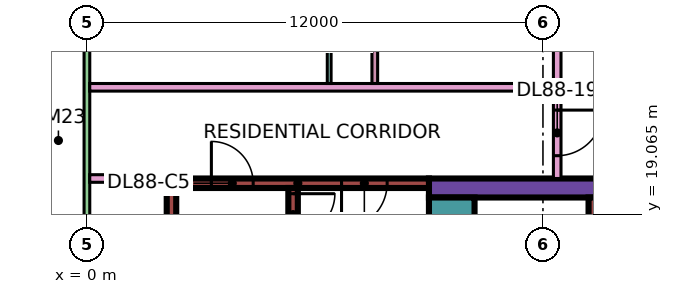
"""IFC4 building model, lengths in metres.
Left out: names, types, materials, properties, quantities, classifications, styles, units other than length and angle.
Written with IfcOpenShell. Run it as: python <this file> out.ifc"""

import sys

from ifc_helpers import new_model, si_unit, direction, frame, frame_2d, origin, place, context, subcontext, project, spatial, rectangle, extrude, element, fill, save


model = new_model("IFC4")
c1 = context("Model", 3, precision=1e-05, world=origin(), true_north=direction((0.0, 1.0)))
c2 = subcontext(c1, "Body", "Model", "MODEL_VIEW")
j1 = project(units=[si_unit("LENGTHUNIT", "METRE"), si_unit("PLANEANGLEUNIT", "RADIAN")], contexts=[c1])
p1 = place(None, origin())
s1 = spatial("IfcSite", under=j1, at=p1, CompositionType="ELEMENT")
p2 = place(p1, origin())
s2 = spatial("IfcBuilding", under=s1, at=p2, CompositionType="ELEMENT")
p3 = place(p2, frame((0.0, 0.0, 376.4)))
s3 = spatial("IfcBuildingStorey", under=s2, at=p3, CompositionType="ELEMENT", Elevation=376.4)
p4 = place(p3, frame((9.0, 19.75, 0.0), z_axis=(0.0, 0.0, 1.0), x_axis=(1.0, 0.0, 0.0)))
e1 = element("IfcWall", 1, at=p4, inside=s3, PredefinedType="SHEAR", context=c2, shape_type="SweptSolid", body=[
    extrude(rectangle(XDim=25.0, YDim=0.5, at=frame_2d((12.5, 0.0))), origin(), (0.0, 0.0, 1.0), 3.75),
])
p5 = place(p4, frame((19.1, 0.0, 0.0)))
e2 = element("IfcOpeningElement", 2, at=p5, cuts=e1, PredefinedType="OPENING", context=c2, shape_type="SweptSolid", body=[
    extrude(rectangle(XDim=1.8, YDim=2.4, at=frame_2d((0.9, 1.2))), frame((0.0, 0.26, 0.0), z_axis=(0.0, -1.0, 0.0), x_axis=(1.0, 0.0, 0.0)), (0.0, 0.0, 1.0), 0.52),
])
p6 = place(p3, frame((9.6, 7.5, 0.0), z_axis=(0.0, 0.0, 1.0), x_axis=(0.0, 1.0, 0.0)))
e3 = element("IfcWall", 3, at=p6, inside=s3, PredefinedType="SHEAR", context=c2, shape_type="SweptSolid", body=[
    extrude(rectangle(XDim=12.0, YDim=1.2, at=frame_2d((6.0, 0.0))), origin(), (0.0, 0.0, 1.0), 3.75),
])
p7 = place(p6, frame((4.375, 0.0, 0.0)))
e4 = element("IfcOpeningElement", 4, at=p7, cuts=e3, PredefinedType="OPENING", context=c2, shape_type="SweptSolid", body=[
    extrude(rectangle(XDim=1.1, YDim=2.2, at=frame_2d((0.55, 1.1))), frame((0.0, 0.61, 0.0), z_axis=(0.0, -1.0, 0.0), x_axis=(1.0, 0.0, 0.0)), (0.0, 0.0, 1.0), 1.22),
])
p8 = place(p6, frame((6.875, 0.0, 0.0)))
e5 = element("IfcOpeningElement", 5, at=p8, cuts=e3, PredefinedType="OPENING", context=c2, shape_type="SweptSolid", body=[
    extrude(rectangle(XDim=1.1, YDim=2.2, at=frame_2d((0.55, 1.1))), frame((0.0, 0.61, 0.0), z_axis=(0.0, -1.0, 0.0), x_axis=(1.0, 0.0, 0.0)), (0.0, 0.0, 1.0), 1.22),
])
p9 = place(p6, frame((9.85, 0.0, 0.0)))
e6 = element("IfcOpeningElement", 6, at=p9, cuts=e3, PredefinedType="OPENING", context=c2, shape_type="SweptSolid", body=[
    extrude(rectangle(XDim=1.1, YDim=2.2, at=frame_2d((0.55, 1.1))), frame((0.0, 0.61, 0.0), z_axis=(0.0, -1.0, 0.0), x_axis=(1.0, 0.0, 0.0)), (0.0, 0.0, 1.0), 1.22),
])
p10 = place(p6, frame((2.05, 0.0, 0.0)))
e7 = element("IfcOpeningElement", 7, at=p10, cuts=e3, PredefinedType="OPENING", context=c2, shape_type="SweptSolid", body=[
    extrude(rectangle(XDim=0.9, YDim=2.1, at=frame_2d((0.45, 1.05))), frame((0.0, 0.61, 0.0), z_axis=(0.0, -1.0, 0.0), x_axis=(1.0, 0.0, 0.0)), (0.0, 0.0, 1.0), 1.22),
])
p11 = place(p3, frame((13.325, 7.5, 0.0), z_axis=(0.0, 0.0, 1.0), x_axis=(0.0, 1.0, 0.0)))
e8 = element("IfcWall", 8, at=p11, inside=s3, PredefinedType="SHEAR", context=c2, shape_type="SweptSolid", body=[
    extrude(rectangle(XDim=12.0, YDim=0.25, at=frame_2d((6.0, 0.0))), origin(), (0.0, 0.0, 1.0), 3.75),
])
p12 = place(p3, frame((2.1, 19.875, 0.0), z_axis=(0.0, 0.0, 1.0), x_axis=(1.0, 0.0, 0.0)))
e9 = element("IfcWall", 9, at=p12, inside=s3, PredefinedType="SHEAR", context=c2, shape_type="SweptSolid", body=[
    extrude(rectangle(XDim=6.9, YDim=0.25, at=frame_2d((3.45, 0.0))), origin(), (0.0, 0.0, 1.0), 3.75),
])
p13 = place(p12, frame((1.175, 0.0, 0.0)))
e10 = element("IfcOpeningElement", 10, at=p13, cuts=e9, PredefinedType="OPENING", context=c2, shape_type="SweptSolid", body=[
    extrude(rectangle(XDim=1.1, YDim=2.2, at=frame_2d((0.55, 1.1))), frame((0.0, 0.135, 0.0), z_axis=(0.0, -1.0, 0.0), x_axis=(1.0, 0.0, 0.0)), (0.0, 0.0, 1.0), 0.27),
])
p14 = place(p12, frame((4.6, 0.0, 0.0)))
e11 = element("IfcOpeningElement", 11, at=p14, cuts=e9, PredefinedType="OPENING", context=c2, shape_type="SweptSolid", body=[
    extrude(rectangle(XDim=1.2, YDim=2.2, at=frame_2d((0.6, 1.1))), frame((0.0, 0.135, 0.0), z_axis=(0.0, -1.0, 0.0), x_axis=(1.0, 0.0, 0.0)), (0.0, 0.0, 1.0), 0.27),
])
p15 = place(p3, frame((2.225, 13.25, 0.0), z_axis=(0.0, 0.0, 1.0), x_axis=(0.0, 1.0, 0.0)))
e12 = element("IfcWall", 12, at=p15, inside=s3, PredefinedType="SHEAR", context=c2, shape_type="SweptSolid", body=[
    extrude(rectangle(XDim=6.5, YDim=0.25, at=frame_2d((3.25, 0.0))), origin(), (0.0, 0.0, 1.0), 3.75),
])
p16 = place(p3, frame((5.425, 13.25, 0.0), z_axis=(0.0, 0.0, 1.0), x_axis=(0.0, 1.0, 0.0)))
e13 = element("IfcWall", 13, at=p16, inside=s3, PredefinedType="SHEAR", context=c2, shape_type="SweptSolid", body=[
    extrude(rectangle(XDim=6.5, YDim=0.25, at=frame_2d((3.25, 0.0))), origin(), (0.0, 0.0, 1.0), 3.75),
])
p17 = place(p16, frame((5.25, 0.0, 0.0)))
e14 = element("IfcOpeningElement", 14, at=p17, cuts=e13, PredefinedType="OPENING", context=c2, shape_type="SweptSolid", body=[
    extrude(rectangle(XDim=1.1, YDim=2.2, at=frame_2d((0.55, 1.1))), frame((0.0, 0.135, 0.0), z_axis=(0.0, -1.0, 0.0), x_axis=(1.0, 0.0, 0.0)), (0.0, 0.0, 1.0), 0.27),
])
p18 = place(p3, frame((0.0, 23.925, 0.0), z_axis=(0.0, 0.0, 1.0), x_axis=(0.0, -1.0, 0.0)))
e15 = element("IfcWall", 15, at=p18, inside=s3, PredefinedType="SOLIDWALL", context=c2, shape_type="SweptSolid", body=[
    extrude(rectangle(XDim=11.35, YDim=0.15, at=frame_2d((5.675, 0.0))), origin(), (0.0, 0.0, 1.0), 3.35),
])
p19 = place(p18, frame((6.738, 0.0, 0.0)))
e16 = element("IfcOpeningElement", 16, at=p19, cuts=e15, PredefinedType="OPENING", context=c2, shape_type="SweptSolid", body=[
    extrude(rectangle(XDim=1.8, YDim=2.4, at=frame_2d((0.9, 1.2))), frame((0.0, 0.085, 0.0), z_axis=(0.0, -1.0, 0.0), x_axis=(1.0, 0.0, 0.0)), (0.0, 0.0, 1.0), 0.17),
])
p20 = place(p3, frame((0.074, 20.0, 0.0), z_axis=(0.0, 0.0, 1.0), x_axis=(1.0, 0.0, 0.0)))
e17 = element("IfcWall", 17, at=p20, inside=s3, PredefinedType="PARTITIONING", context=c2, shape_type="SweptSolid", body=[
    extrude(rectangle(XDim=2.026, YDim=0.2, at=frame_2d((1.013, 0.0))), origin(), (0.0, 0.0, 1.0), 3.35),
])
p21 = place(p3, frame((0.074, 22.4, 0.0), z_axis=(0.0, 0.0, 1.0), x_axis=(1.0, 0.0, 0.0)))
e18 = element("IfcWall", 18, at=p21, inside=s3, PredefinedType="PARTITIONING", context=c2, shape_type="SweptSolid", body=[
    extrude(rectangle(XDim=12.201, YDim=0.2, at=frame_2d((6.101, 0.0))), origin(), (0.0, 0.0, 1.0), 3.35),
])
p22 = place(p3, frame((6.375, 22.5, 0.0), z_axis=(0.0, 0.0, 1.0), x_axis=(0.0, 1.0, 0.0)))
e19 = element("IfcWall", 19, at=p22, inside=s3, PredefinedType="PARTITIONING", context=c2, shape_type="SweptSolid", body=[
    extrude(rectangle(XDim=7.55, YDim=0.1, at=frame_2d((3.775, 0.0))), origin(), (0.0, 0.0, 1.0), 3.35),
])
p23 = place(p22, frame((1.8, 0.0, 0.0)))
e20 = element("IfcOpeningElement", 20, at=p23, cuts=e19, PredefinedType="OPENING", context=c2, shape_type="SweptSolid", body=[
    extrude(rectangle(XDim=0.9, YDim=2.1, at=frame_2d((0.45, 1.05))), frame((0.0, 0.06, 0.0), z_axis=(0.0, -1.0, 0.0), x_axis=(1.0, 0.0, 0.0)), (0.0, 0.0, 1.0), 0.12),
])
p24 = place(p22, frame((5.55, 0.0, 0.0)))
e21 = element("IfcOpeningElement", 21, at=p24, cuts=e19, PredefinedType="OPENING", context=c2, shape_type="SweptSolid", body=[
    extrude(rectangle(XDim=0.9, YDim=2.1, at=frame_2d((0.45, 1.05))), frame((0.0, 0.06, 0.0), z_axis=(0.0, -1.0, 0.0), x_axis=(1.0, 0.0, 0.0)), (0.0, 0.0, 1.0), 0.12),
])
p25 = place(p3, frame((7.575, 22.5, 0.0), z_axis=(0.0, 0.0, 1.0), x_axis=(0.0, 1.0, 0.0)))
e22 = element("IfcWall", 22, at=p25, inside=s3, PredefinedType="PARTITIONING", context=c2, shape_type="SweptSolid", body=[
    extrude(rectangle(XDim=10.875, YDim=0.15, at=frame_2d((5.438, 0.0))), origin(), (0.0, 0.0, 1.0), 3.35),
])
p26 = place(p25, frame((8.55, 0.0, 0.0)))
e23 = element("IfcOpeningElement", 23, at=p26, cuts=e22, PredefinedType="OPENING", context=c2, shape_type="SweptSolid", body=[
    extrude(rectangle(XDim=0.8, YDim=2.1, at=frame_2d((0.4, 1.05))), frame((0.0, 0.085, 0.0), z_axis=(0.0, -1.0, 0.0), x_axis=(1.0, 0.0, 0.0)), (0.0, 0.0, 1.0), 0.17),
])
p27 = place(p25, frame((3.05, 0.0, 0.0)))
e24 = element("IfcOpeningElement", 24, at=p27, cuts=e22, PredefinedType="OPENING", context=c2, shape_type="SweptSolid", body=[
    extrude(rectangle(XDim=0.9, YDim=2.1, at=frame_2d((0.45, 1.05))), frame((0.0, 0.085, 0.0), z_axis=(0.0, -1.0, 0.0), x_axis=(1.0, 0.0, 0.0)), (0.0, 0.0, 1.0), 0.17),
])
p28 = place(p3, frame((12.375, 20.0, 0.0), z_axis=(0.0, 0.0, 1.0), x_axis=(0.0, 1.0, 0.0)))
e25 = element("IfcWall", 25, at=p28, inside=s3, PredefinedType="PARTITIONING", context=c2, shape_type="SweptSolid", body=[
    extrude(rectangle(XDim=33.926, YDim=0.2, at=frame_2d((16.963, 0.0))), origin(), (0.0, 0.0, 1.0), 3.35),
])
p29 = place(p28, frame((27.6, 0.0, 0.0)))
e26 = element("IfcOpeningElement", 26, at=p29, cuts=e25, PredefinedType="OPENING", context=c2, shape_type="SweptSolid", body=[
    extrude(rectangle(XDim=1.0, YDim=2.1, at=frame_2d((0.5, 1.05))), frame((0.0, 0.11, 0.0), z_axis=(0.0, -1.0, 0.0), x_axis=(1.0, 0.0, 0.0)), (0.0, 0.0, 1.0), 0.22),
])
p30 = place(p28, frame((0.6, 0.0, 0.0)))
e27 = element("IfcOpeningElement", 27, at=p30, cuts=e25, PredefinedType="OPENING", context=c2, shape_type="SweptSolid", body=[
    extrude(rectangle(XDim=1.2, YDim=2.1, at=frame_2d((0.6, 1.05))), frame((0.0, 0.11, 0.0), z_axis=(0.0, -1.0, 0.0), x_axis=(1.0, 0.0, 0.0)), (0.0, 0.0, 1.0), 0.22),
])
p31 = place(p28, frame((14.1, 0.0, 0.0)))
e28 = element("IfcOpeningElement", 28, at=p31, cuts=e25, PredefinedType="OPENING", context=c2, shape_type="SweptSolid", body=[
    extrude(rectangle(XDim=1.0, YDim=2.1, at=frame_2d((0.5, 1.05))), frame((0.0, 0.11, 0.0), z_axis=(0.0, -1.0, 0.0), x_axis=(1.0, 0.0, 0.0)), (0.0, 0.0, 1.0), 0.22),
])
p32 = place(p17, origin())
e29 = element("IfcDoor", 29, at=p32, inside=s3, OperationType="SINGLE_SWING_RIGHT", PredefinedType="DOOR", context=c2, shape_type="SweptSolid", body=[
    extrude(rectangle(XDim=1.1, YDim=2.2, at=frame_2d((0.55, 1.1))), frame((0.0, 0.025, 0.0), z_axis=(0.0, -1.0, 0.0), x_axis=(1.0, 0.0, 0.0)), (0.0, 0.0, 1.0), 0.05),
])
fill(e14, e29)
p33 = place(p13, origin())
e30 = element("IfcDoor", 30, at=p33, inside=s3, OperationType="SINGLE_SWING_LEFT", PredefinedType="DOOR", context=c2, shape_type="SweptSolid", body=[
    extrude(rectangle(XDim=1.1, YDim=2.2, at=frame_2d((0.55, 1.1))), frame((0.0, 0.025, 0.0), z_axis=(0.0, -1.0, 0.0), x_axis=(1.0, 0.0, 0.0)), (0.0, 0.0, 1.0), 0.05),
])
fill(e10, e30)
p34 = place(p14, frame((1.2, 0.0, 0.0), z_axis=(0.0, 0.0, 1.0), x_axis=(-1.0, 0.0, 0.0)))
e31 = element("IfcDoor", 31, at=p34, inside=s3, OperationType="SINGLE_SWING_LEFT", PredefinedType="DOOR", context=c2, shape_type="SweptSolid", body=[
    extrude(rectangle(XDim=1.2, YDim=2.2, at=frame_2d((0.6, 1.1))), frame((0.0, 0.025, 0.0), z_axis=(0.0, -1.0, 0.0), x_axis=(1.0, 0.0, 0.0)), (0.0, 0.0, 1.0), 0.05),
])
fill(e11, e31)
p35 = place(p30, origin())
e32 = element("IfcDoor", 32, at=p35, inside=s3, OperationType="SINGLE_SWING_RIGHT", PredefinedType="DOOR", context=c2, shape_type="SweptSolid", body=[
    extrude(rectangle(XDim=1.2, YDim=2.1, at=frame_2d((0.6, 1.05))), frame((0.0, 0.025, 0.0), z_axis=(0.0, -1.0, 0.0), x_axis=(1.0, 0.0, 0.0)), (0.0, 0.0, 1.0), 0.05),
])
fill(e27, e32)
save(model, sys.argv[1])
